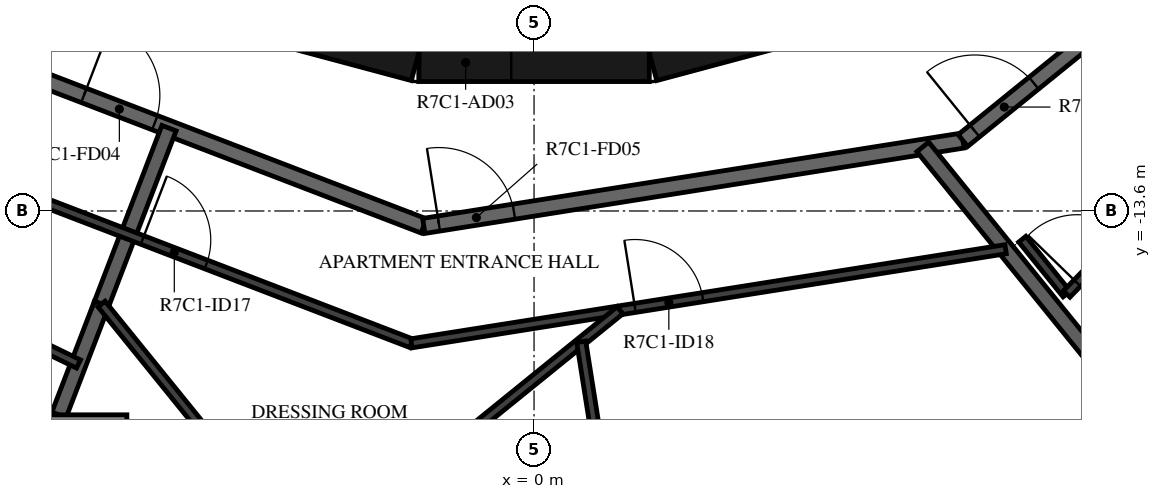
"""IFC4 building model, lengths in metres.
Left out: names, types, materials, properties, quantities, classifications, styles, units other than length and angle.
Written with IfcOpenShell. Run it as: python <this file> out.ifc"""

import sys

from ifc_helpers import new_model, si_unit, direction, frame, frame_2d, origin, place, context, subcontext, project, spatial, polyline, rectangle, outline, extrude, element, fill, save


model = new_model("IFC4")
c1 = context("Model", 3, precision=1e-05, world=origin(), true_north=direction((0.0, 1.0)))
c2 = subcontext(c1, "Body", "Model", "MODEL_VIEW")
j1 = project(units=[si_unit("LENGTHUNIT", "METRE"), si_unit("PLANEANGLEUNIT", "RADIAN")], contexts=[c1])
p1 = place(None, origin())
s1 = spatial("IfcSite", under=j1, at=p1, CompositionType="ELEMENT")
p2 = place(p1, origin())
s2 = spatial("IfcBuilding", under=s1, at=p2, CompositionType="ELEMENT")
p3 = place(p2, frame((0.0, 0.0, 287.9)))
s3 = spatial("IfcBuildingStorey", under=s2, at=p3, CompositionType="ELEMENT", Elevation=287.9)
for number, where, z_axis, x_axis in (
    (1, (1.55, -11.643, 0.0), (0.0, 0.0, 1.0), (0.966, 0.259, 0.0)),
    (2, (-4.479, -10.858, 0.0), (0.0, 0.0, 1.0), (0.966, -0.259, 0.0)),
):
    element("IfcWall", number, at=place(p3, frame(where, z_axis=z_axis, x_axis=x_axis)), inside=s3, PredefinedType="SHEAR", context=c2, shape_type="SweptSolid", body=[
        extrude(rectangle(XDim=3.033, YDim=0.5, at=frame_2d((1.516, 0.0))), origin(), (0.0, 0.0, 1.0), 3.05),
    ])
p4 = place(p3, frame((-1.516, -11.647, 0.0), z_axis=(0.0, 0.0, 1.0), x_axis=(1.0, 0.0, 0.0)))
e3 = element("IfcWall", 3, at=p4, inside=s3, PredefinedType="SHEAR", context=c2, shape_type="SweptSolid", body=[
    extrude(rectangle(XDim=3.033, YDim=0.5, at=frame_2d((1.516, 0.0))), origin(), (0.0, 0.0, 1.0), 3.05),
])
p5 = place(p4, frame((0.016, 0.0, 0.0)))
e4 = element("IfcOpeningElement", 4, at=p5, cuts=e3, PredefinedType="OPENING", context=c2, shape_type="SweptSolid", body=[
    extrude(rectangle(XDim=1.2, YDim=2.1, at=frame_2d((0.6, 1.05))), frame((0.0, 0.26, 0.0), z_axis=(0.0, -1.0, 0.0), x_axis=(1.0, 0.0, 0.0)), (0.0, 0.0, 1.0), 0.52),
])
p6 = place(p3, frame((-8.154, -11.223, 0.0), z_axis=(0.0, 0.0, 1.0), x_axis=(0.93359073609, -0.358341090983, 0.0)))
e5 = element("IfcWall", 5, at=p6, inside=s3, PredefinedType="STANDARD", context=c2, shape_type="SweptSolid", body=[
    extrude(rectangle(XDim=7.181, YDim=0.2, at=frame_2d((3.59, 0.0))), origin(), (0.0, 0.0, 1.0), 3.05),
])
p7 = place(p6, frame((2.39, 0.0, 0.0)))
e6 = element("IfcOpeningElement", 6, at=p7, cuts=e5, PredefinedType="OPENING", context=c2, shape_type="SweptSolid", body=[
    extrude(rectangle(XDim=1.0, YDim=2.1, at=frame_2d((0.5, 1.05))), frame((0.0, 0.11, 0.0), z_axis=(0.0, -1.0, 0.0), x_axis=(1.0, 0.0, 0.0)), (0.0, 0.0, 1.0), 0.22),
])
p8 = place(p3, frame((-1.45, -13.797, 0.0), z_axis=(0.0, 0.0, 1.0), x_axis=(0.987690361611, 0.156421704315, 0.0)))
e7 = element("IfcWall", 7, at=p8, inside=s3, PredefinedType="STANDARD", context=c2, shape_type="SweptSolid", body=[
    extrude(rectangle(XDim=7.181, YDim=0.2, at=frame_2d((3.591, 0.0))), origin(), (0.0, 0.0, 1.0), 3.05),
])
p9 = place(p8, frame((0.2, 0.0, 0.0)))
e8 = element("IfcOpeningElement", 8, at=p9, cuts=e7, PredefinedType="OPENING", context=c2, shape_type="SweptSolid", body=[
    extrude(rectangle(XDim=1.0, YDim=2.1, at=frame_2d((0.5, 1.05))), frame((0.0, 0.11, 0.0), z_axis=(0.0, -1.0, 0.0), x_axis=(1.0, 0.0, 0.0)), (0.0, 0.0, 1.0), 0.22),
])
p10 = place(p3, frame((5.643, -12.673, 0.0), z_axis=(0.0, 0.0, 1.0), x_axis=(0.777160148113, 0.629302871585, 0.0)))
e9 = element("IfcWall", 9, at=p10, inside=s3, PredefinedType="STANDARD", context=c2, shape_type="SweptSolid", body=[
    extrude(rectangle(XDim=7.181, YDim=0.2, at=frame_2d((3.59, 0.0))), origin(), (0.0, 0.0, 1.0), 3.05),
])
p11 = place(p10, frame((0.2, 0.0, 0.0)))
e10 = element("IfcOpeningElement", 10, at=p11, cuts=e9, PredefinedType="OPENING", context=c2, shape_type="SweptSolid", body=[
    extrude(rectangle(XDim=1.0, YDim=2.1, at=frame_2d((0.5, 1.05))), frame((0.0, 0.11, 0.0), z_axis=(0.0, -1.0, 0.0), x_axis=(1.0, 0.0, 0.0)), (0.0, 0.0, 1.0), 0.22),
])
p12 = place(p3, frame((-5.69, -14.824, 0.0), z_axis=(0.0, 0.0, 1.0), x_axis=(0.358345342952, 0.933589104041, 0.0)))
e11 = element("IfcWall", 11, at=p12, inside=s3, PredefinedType="STANDARD", context=c2, shape_type="SweptSolid", body=[
    extrude(rectangle(XDim=2.479, YDim=0.2, at=frame_2d((1.239, 0.0))), origin(), (0.0, 0.0, 1.0), 3.05),
])
p13 = place(p3, frame((-6.25, -16.282, 0.0), z_axis=(0.0, 0.0, 1.0), x_axis=(0.358360842469, 0.933583154617, 0.0)))
e12 = element("IfcWall", 12, at=p13, inside=s3, PredefinedType="STANDARD", context=c2, shape_type="SweptSolid", body=[
    extrude(rectangle(XDim=1.562, YDim=0.2, at=frame_2d((0.781, 0.0))), origin(), (0.0, 0.0, 1.0), 3.05),
])
p14 = place(p3, frame((7.861, -16.148, 0.0), z_axis=(0.0, 0.0, 1.0), x_axis=(-0.629330189513, 0.777138026716, 0.0)))
e13 = element("IfcWall", 13, at=p14, inside=s3, PredefinedType="STANDARD", context=c2, shape_type="SweptSolid", body=[
    extrude(rectangle(XDim=4.364, YDim=0.2, at=frame_2d((2.182, 0.0))), origin(), (0.0, 0.0, 1.0), 3.05),
])
p15 = place(p3, frame((-9.067, -12.479, 0.0), z_axis=(0.0, 0.0, 1.0), x_axis=(0.933579449035, -0.358370495911, 0.0)))
e14 = element("IfcWall", 14, at=p15, inside=s3, PredefinedType="PARTITIONING", context=c2, shape_type="SweptSolid", body=[
    extrude(rectangle(XDim=7.985, YDim=0.12, at=frame_2d((3.992, 0.0))), origin(), (0.0, 0.0, 1.0), 3.05),
])
p16 = place(p15, frame((4.192, 0.0, 0.0)))
e15 = element("IfcOpeningElement", 15, at=p16, cuts=e14, PredefinedType="OPENING", context=c2, shape_type="SweptSolid", body=[
    extrude(rectangle(XDim=0.9, YDim=2.1, at=frame_2d((0.45, 1.05))), frame((0.0, 0.07, 0.0), z_axis=(0.0, -1.0, 0.0), x_axis=(1.0, 0.0, 0.0)), (0.0, 0.0, 1.0), 0.14),
])
p17 = place(p3, frame((-12.064, -12.662, 0.0), z_axis=(0.0, 0.0, 1.0), x_axis=(0.899383852228, -0.437159794985, 0.0)))
e16 = element("IfcWall", 16, at=p17, inside=s3, PredefinedType="PARTITIONING", context=c2, shape_type="SweptSolid", body=[
    extrude(rectangle(XDim=6.75, YDim=0.12, at=frame_2d((3.375, 0.0))), origin(), (0.0, 0.0, 1.0), 3.05),
])
p18 = place(p17, frame((0.5, 0.0, 0.0)))
e17 = element("IfcOpeningElement", 17, at=p18, cuts=e16, PredefinedType="OPENING", context=c2, shape_type="SweptSolid", body=[
    extrude(rectangle(XDim=0.9, YDim=2.1, at=frame_2d((0.45, 1.05))), frame((0.0, 0.07, 0.0), z_axis=(0.0, -1.0, 0.0), x_axis=(1.0, 0.0, 0.0)), (0.0, 0.0, 1.0), 0.14),
])
p19 = place(p3, frame((-1.612, -15.341, 0.0), z_axis=(0.0, 0.0, 1.0), x_axis=(0.987687560018, 0.15643939333, 0.0)))
e18 = element("IfcWall", 18, at=p19, inside=s3, PredefinedType="PARTITIONING", context=c2, shape_type="SweptSolid", body=[
    extrude(rectangle(XDim=7.914, YDim=0.12, at=frame_2d((3.957, 0.0))), origin(), (0.0, 0.0, 1.0), 3.05),
])
p20 = place(p19, frame((2.978, 0.0, 0.0)))
e19 = element("IfcOpeningElement", 19, at=p20, cuts=e18, PredefinedType="OPENING", context=c2, shape_type="SweptSolid", body=[
    extrude(rectangle(XDim=0.9, YDim=2.1, at=frame_2d((0.45, 1.05))), frame((0.0, 0.07, 0.0), z_axis=(0.0, -1.0, 0.0), x_axis=(1.0, 0.0, 0.0)), (0.0, 0.0, 1.0), 0.14),
])
p21 = place(p3, frame((-2.948, -18.21, 0.0), z_axis=(0.0, 0.0, 1.0), x_axis=(-0.629330389268, 0.777137864953, 0.0)))
e20 = element("IfcWall", 20, at=p21, inside=s3, PredefinedType="PARTITIONING", context=c2, shape_type="SweptSolid", body=[
    extrude(rectangle(XDim=4.357, YDim=0.12, at=frame_2d((2.179, 0.0))), origin(), (0.0, 0.0, 1.0), 3.05),
])
p22 = place(p21, frame((0.2, 0.0, 0.0)))
e21 = element("IfcOpeningElement", 21, at=p22, cuts=e20, PredefinedType="OPENING", context=c2, shape_type="SweptSolid", body=[
    extrude(rectangle(XDim=0.8, YDim=2.1, at=frame_2d((0.4, 1.05))), frame((0.0, 0.07, 0.0), z_axis=(0.0, -1.0, 0.0), x_axis=(1.0, 0.0, 0.0)), (0.0, 0.0, 1.0), 0.14),
])
p23 = place(p3, frame((-4.809, -19.717, 0.0), z_axis=(0.0, 0.0, 1.0), x_axis=(0.777140730041, 0.629326851255, 0.0)))
e22 = element("IfcWall", 22, at=p23, inside=s3, PredefinedType="PARTITIONING", context=c2, shape_type="SweptSolid", body=[
    extrude(rectangle(XDim=7.644, YDim=0.12, at=frame_2d((3.822, 0.0))), origin(), (0.0, 0.0, 1.0), 3.05),
])
p24 = place(p23, frame((2.954, 0.0, 0.0)))
e23 = element("IfcOpeningElement", 23, at=p24, cuts=e22, PredefinedType="OPENING", context=c2, shape_type="SweptSolid", body=[
    extrude(rectangle(XDim=0.9, YDim=2.1, at=frame_2d((0.45, 1.05))), frame((0.0, 0.07, 0.0), z_axis=(0.0, -1.0, 0.0), x_axis=(1.0, 0.0, 0.0)), (0.0, 0.0, 1.0), 0.14),
])
p25 = place(p3, frame((1.56, -21.251, 0.0), z_axis=(0.0, 0.0, 1.0), x_axis=(-0.156421913213, 0.987690328528, 0.0)))
e24 = element("IfcWall", 24, at=p25, inside=s3, PredefinedType="PARTITIONING", context=c2, shape_type="SweptSolid", body=[
    extrude(rectangle(XDim=6.004, YDim=0.12, at=frame_2d((3.002, 0.0))), origin(), (0.0, 0.0, 1.0), 3.05),
])
p26 = place(p3, frame((6.424, -13.971, 0.0), z_axis=(0.0, 0.0, 1.0), x_axis=(0.629273936268, -0.777183577499, 0.0)))
e25 = element("IfcWall", 25, at=p26, inside=s3, PredefinedType="PARTITIONING", context=c2, shape_type="SweptSolid", body=[
    extrude(rectangle(XDim=0.928, YDim=0.12, at=frame_2d((0.464, 0.0))), origin(), (0.0, 0.0, 1.0), 3.05),
])
p27 = place(p3, frame((7.007, -14.692, 0.0), z_axis=(0.0, 0.0, 1.0), x_axis=(0.697286714348, 0.716792325568, 0.0)))
e26 = element("IfcWall", 26, at=p27, inside=s3, PredefinedType="PARTITIONING", context=c2, shape_type="SweptSolid", body=[
    extrude(rectangle(XDim=7.848, YDim=0.12, at=frame_2d((3.924, 0.0))), origin(), (0.0, 0.0, 1.0), 3.05),
])
p28 = place(p27, frame((0.2, 0.0, 0.0)))
e27 = element("IfcOpeningElement", 27, at=p28, cuts=e26, PredefinedType="OPENING", context=c2, shape_type="SweptSolid", body=[
    extrude(rectangle(XDim=0.9, YDim=2.1, at=frame_2d((0.45, 1.05))), frame((0.0, 0.07, 0.0), z_axis=(0.0, -1.0, 0.0), x_axis=(1.0, 0.0, 0.0)), (0.0, 0.0, 1.0), 0.14),
])
p29 = place(p3, origin())
e28 = element("IfcWall", 28, at=p29, inside=s3, PredefinedType="STANDARD", context=c2, shape_type="SweptSolid", body=[
    extrude(outline(polyline([(-5.357, -16.282), (-5.357, -19.182), (-8.257, -19.182), (-8.257, -16.282), (-5.357, -16.282)]), holes=[polyline([(-8.057, -18.982), (-5.557, -18.982), (-5.557, -16.482), (-8.057, -16.482), (-8.057, -18.982)])]), origin(), (0.0, 0.0, 1.0), 3.05),
])
p30 = place(p5, origin())
e29 = element("IfcDoor", 29, at=p30, inside=s3, OperationType="SINGLE_SWING_RIGHT", PredefinedType="DOOR", context=c2, shape_type="SweptSolid", body=[
    extrude(rectangle(XDim=1.2, YDim=2.1, at=frame_2d((0.6, 1.05))), frame((0.0, 0.025, 0.0), z_axis=(0.0, -1.0, 0.0), x_axis=(1.0, 0.0, 0.0)), (0.0, 0.0, 1.0), 0.05),
])
fill(e4, e29)
p31 = place(p7, origin())
e30 = element("IfcDoor", 30, at=p31, inside=s3, OperationType="SINGLE_SWING_RIGHT", PredefinedType="DOOR", context=c2, shape_type="SweptSolid", body=[
    extrude(rectangle(XDim=1.0, YDim=2.1, at=frame_2d((0.5, 1.05))), frame((0.0, 0.025, 0.0), z_axis=(0.0, -1.0, 0.0), x_axis=(1.0, 0.0, 0.0)), (0.0, 0.0, 1.0), 0.05),
])
fill(e6, e30)
p32 = place(p9, origin())
e31 = element("IfcDoor", 31, at=p32, inside=s3, OperationType="SINGLE_SWING_LEFT", PredefinedType="DOOR", context=c2, shape_type="SweptSolid", body=[
    extrude(rectangle(XDim=1.0, YDim=2.1, at=frame_2d((0.5, 1.05))), frame((0.0, 0.025, 0.0), z_axis=(0.0, -1.0, 0.0), x_axis=(1.0, 0.0, 0.0)), (0.0, 0.0, 1.0), 0.05),
])
fill(e8, e31)
p33 = place(p16, origin())
e32 = element("IfcDoor", 32, at=p33, inside=s3, OperationType="SINGLE_SWING_RIGHT", PredefinedType="DOOR", context=c2, shape_type="SweptSolid", body=[
    extrude(rectangle(XDim=0.9, YDim=2.1, at=frame_2d((0.45, 1.05))), frame((0.0, 0.025, 0.0), z_axis=(0.0, -1.0, 0.0), x_axis=(1.0, 0.0, 0.0)), (0.0, 0.0, 1.0), 0.05),
])
fill(e15, e32)
p34 = place(p20, origin())
e33 = element("IfcDoor", 33, at=p34, inside=s3, OperationType="SINGLE_SWING_LEFT", PredefinedType="DOOR", context=c2, shape_type="SweptSolid", body=[
    extrude(rectangle(XDim=0.9, YDim=2.1, at=frame_2d((0.45, 1.05))), frame((0.0, 0.025, 0.0), z_axis=(0.0, -1.0, 0.0), x_axis=(1.0, 0.0, 0.0)), (0.0, 0.0, 1.0), 0.05),
])
fill(e19, e33)
p35 = place(p11, origin())
e34 = element("IfcDoor", 34, at=p35, inside=s3, OperationType="SINGLE_SWING_LEFT", PredefinedType="DOOR", context=c2, shape_type="SweptSolid", body=[
    extrude(rectangle(XDim=1.0, YDim=2.1, at=frame_2d((0.5, 1.05))), frame((0.0, 0.025, 0.0), z_axis=(0.0, -1.0, 0.0), x_axis=(1.0, 0.0, 0.0)), (0.0, 0.0, 1.0), 0.05),
])
fill(e10, e34)
p36 = place(p28, origin())
e35 = element("IfcDoor", 35, at=p36, inside=s3, OperationType="SINGLE_SWING_LEFT", PredefinedType="DOOR", context=c2, shape_type="SweptSolid", body=[
    extrude(rectangle(XDim=0.9, YDim=2.1, at=frame_2d((0.45, 1.05))), frame((0.0, 0.025, 0.0), z_axis=(0.0, -1.0, 0.0), x_axis=(1.0, 0.0, 0.0)), (0.0, 0.0, 1.0), 0.05),
])
fill(e27, e35)
save(model, sys.argv[1])
